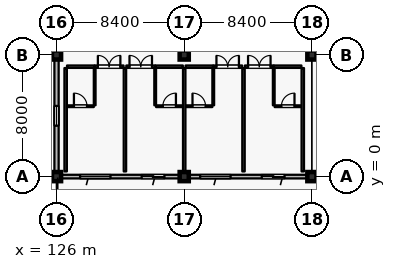
"""IFC4 building model, lengths in metres.
Left out: names, types, materials, properties, quantities, classifications, styles, units other than length and angle.
Written with IfcOpenShell. Run it as: python <this file> out.ifc"""

import sys

from ifc_helpers import new_model, si_unit, direction, frame, frame_2d, origin, origin_2d, place, context, subcontext, project, spatial, rectangle, extrude, element, fill, save


model = new_model("IFC4")
c1 = context("Model", 3, precision=1e-05, world=origin(), true_north=direction((0.0, 1.0)))
c2 = subcontext(c1, "Body", "Model", "MODEL_VIEW")
j1 = project(units=[si_unit("LENGTHUNIT", "METRE"), si_unit("PLANEANGLEUNIT", "RADIAN")], contexts=[c1])
p1 = place(None, origin())
s1 = spatial("IfcSite", under=j1, at=p1, CompositionType="ELEMENT")
p2 = place(p1, origin())
s2 = spatial("IfcBuilding", under=s1, at=p2, CompositionType="ELEMENT")
p3 = place(p2, frame((0.0, 0.0, 47.4)))
s3 = spatial("IfcBuildingStorey", under=s2, at=p3, CompositionType="ELEMENT", Elevation=47.4)
for number, where, z_axis, x_axis in (
    (1, (126.0, 0.0, 0.0), (0.0, 0.0, 1.0), (1.0, 0.0, 0.0)),
    (2, (134.4, 0.0, 0.0), (0.0, 0.0, 1.0), (1.0, 0.0, 0.0)),
    (3, (142.8, 0.0, 0.0), (0.0, 0.0, 1.0), (1.0, 0.0, 0.0)),
    (4, (126.0, 8.0, 0.0), (0.0, 0.0, 1.0), (1.0, 0.0, 0.0)),
    (5, (134.4, 8.0, 0.0), (0.0, 0.0, 1.0), (1.0, 0.0, 0.0)),
    (6, (142.8, 8.0, 0.0), (0.0, 0.0, 1.0), (1.0, 0.0, 0.0)),
):
    element("IfcColumn", number, at=place(p3, frame(where, z_axis=z_axis, x_axis=x_axis)), inside=s3, PredefinedType="COLUMN", context=c2, shape_type="SweptSolid", body=[
        extrude(rectangle(XDim=0.6, YDim=0.6, at=origin_2d()), origin(), (0.0, 0.0, 1.0), 4.2),
    ])
p4 = place(p3, frame((134.1, 0.0, 0.0), z_axis=(0.0, 0.0, 1.0), x_axis=(-1.0, 0.0, 0.0)))
e7 = element("IfcWall", 7, at=p4, inside=s3, PredefinedType="SOLIDWALL", context=c2, shape_type="SweptSolid", body=[
    extrude(rectangle(XDim=7.8, YDim=0.24, at=frame_2d((3.9, 0.0))), origin(), (0.0, 0.0, 1.0), 3.49),
])
p5 = place(p4, frame((1.0, 0.0, 0.0)))
e8 = element("IfcOpeningElement", 8, at=p5, cuts=e7, PredefinedType="OPENING", context=c2, shape_type="SweptSolid", body=[
    extrude(rectangle(XDim=1.5, YDim=2.25, at=frame_2d((0.75, 1.125))), frame((0.0, 0.13, 0.0), z_axis=(0.0, -1.0, 0.0), x_axis=(1.0, 0.0, 0.0)), (0.0, 0.0, 1.0), 0.26),
])
p6 = place(p4, frame((4.55, 0.0, 0.8)))
e9 = element("IfcOpeningElement", 9, at=p6, cuts=e7, PredefinedType="OPENING", context=c2, shape_type="SweptSolid", body=[
    extrude(rectangle(XDim=2.0, YDim=1.75, at=frame_2d((1.0, 0.875))), frame((0.0, 0.13, 0.0), z_axis=(0.0, -1.0, 0.0), x_axis=(1.0, 0.0, 0.0)), (0.0, 0.0, 1.0), 0.26),
])
p7 = place(p3, frame((142.5, 0.0, 0.0), z_axis=(0.0, 0.0, 1.0), x_axis=(-1.0, 0.0, 0.0)))
e10 = element("IfcWall", 10, at=p7, inside=s3, PredefinedType="SOLIDWALL", context=c2, shape_type="SweptSolid", body=[
    extrude(rectangle(XDim=7.8, YDim=0.24, at=frame_2d((3.9, 0.0))), origin(), (0.0, 0.0, 1.0), 3.49),
])
p8 = place(p7, frame((1.5, 0.0, 0.0)))
e11 = element("IfcOpeningElement", 11, at=p8, cuts=e10, PredefinedType="OPENING", context=c2, shape_type="SweptSolid", body=[
    extrude(rectangle(XDim=1.5, YDim=2.25, at=frame_2d((0.75, 1.125))), frame((0.0, 0.13, 0.0), z_axis=(0.0, -1.0, 0.0), x_axis=(1.0, 0.0, 0.0)), (0.0, 0.0, 1.0), 0.26),
])
p9 = place(p7, frame((5.05, 0.0, 0.8)))
e12 = element("IfcOpeningElement", 12, at=p9, cuts=e10, PredefinedType="OPENING", context=c2, shape_type="SweptSolid", body=[
    extrude(rectangle(XDim=2.0, YDim=1.75, at=frame_2d((1.0, 0.875))), frame((0.0, 0.13, 0.0), z_axis=(0.0, -1.0, 0.0), x_axis=(1.0, 0.0, 0.0)), (0.0, 0.0, 1.0), 0.26),
])
p10 = place(p3, frame((126.0, 0.3, 0.0), z_axis=(0.0, 0.0, 1.0), x_axis=(0.0, 1.0, 0.0)))
e13 = element("IfcWall", 13, at=p10, inside=s3, PredefinedType="SOLIDWALL", context=c2, shape_type="SweptSolid", body=[
    extrude(rectangle(XDim=7.4, YDim=0.28, at=frame_2d((3.7, 0.0))), origin(), (0.0, 0.0, 1.0), 3.3),
])
p11 = place(p10, frame((3.05, 0.0, 0.75)))
e14 = element("IfcOpeningElement", 14, at=p11, cuts=e13, PredefinedType="OPENING", context=c2, shape_type="SweptSolid", body=[
    extrude(rectangle(XDim=1.3, YDim=1.65, at=frame_2d((0.65, 0.825))), frame((0.0, 0.15, 0.0), z_axis=(0.0, -1.0, 0.0), x_axis=(1.0, 0.0, 0.0)), (0.0, 0.0, 1.0), 0.3),
])
p12 = place(p3, frame((126.69, 7.23, 0.0), z_axis=(0.0, 0.0, 1.0), x_axis=(1.0, 0.0, 0.0)))
e15 = element("IfcWall", 15, at=p12, inside=s3, PredefinedType="PARTITIONING", context=c2, shape_type="SweptSolid", body=[
    extrude(rectangle(XDim=1.81, YDim=0.16, at=frame_2d((0.905, 0.0))), origin(), (0.0, 0.0, 1.0), 3.935),
])
p13 = place(p3, frame((128.51, 7.23, 0.0), z_axis=(0.0, 0.0, 1.0), x_axis=(1.0, 0.0, 0.0)))
e16 = element("IfcWall", 16, at=p13, inside=s3, PredefinedType="PARTITIONING", context=c2, shape_type="SweptSolid", body=[
    extrude(rectangle(XDim=1.9, YDim=0.16, at=frame_2d((0.95, 0.0))), origin(), (0.0, 0.0, 1.0), 3.935),
])
p14 = place(p13, frame((0.21, 0.0, 0.0)))
e17 = element("IfcOpeningElement", 17, at=p14, cuts=e16, PredefinedType="OPENING", context=c2, shape_type="SweptSolid", body=[
    extrude(rectangle(XDim=1.48, YDim=2.35, at=frame_2d((0.74, 1.175))), frame((0.0, 0.09, 0.0), z_axis=(0.0, -1.0, 0.0), x_axis=(1.0, 0.0, 0.0)), (0.0, 0.0, 1.0), 0.18),
])
p15 = place(p3, frame((128.51, 4.69, 0.0), z_axis=(0.0, 0.0, 1.0), x_axis=(0.0, 1.0, 0.0)))
e18 = element("IfcWall", 18, at=p15, inside=s3, PredefinedType="PARTITIONING", context=c2, shape_type="SweptSolid", body=[
    extrude(rectangle(XDim=2.45, YDim=0.115, at=frame_2d((1.225, 0.0))), origin(), (0.0, 0.0, 1.0), 3.935),
])
p16 = place(p3, frame((126.7, 4.63, 0.0), z_axis=(0.0, 0.0, 1.0), x_axis=(1.0, 0.0, 0.0)))
e19 = element("IfcWall", 19, at=p16, inside=s3, PredefinedType="PARTITIONING", context=c2, shape_type="SweptSolid", body=[
    extrude(rectangle(XDim=1.75, YDim=0.115, at=frame_2d((0.875, 0.0))), origin(), (0.0, 0.0, 1.0), 3.935),
])
p17 = place(p16, frame((0.445, 0.0, 0.0)))
e20 = element("IfcOpeningElement", 20, at=p17, cuts=e19, PredefinedType="OPENING", context=c2, shape_type="SweptSolid", body=[
    extrude(rectangle(XDim=0.86, YDim=2.12, at=frame_2d((0.43, 1.06))), frame((0.0, 0.067, 0.0), z_axis=(0.0, -1.0, 0.0), x_axis=(1.0, 0.0, 0.0)), (0.0, 0.0, 1.0), 0.135),
])
p18 = place(p3, frame((126.6, 0.34, 0.0), z_axis=(0.0, 0.0, 1.0), x_axis=(0.0, 1.0, 0.0)))
e21 = element("IfcWall", 21, at=p18, inside=s3, PredefinedType="PARTITIONING", context=c2, shape_type="SweptSolid", body=[
    extrude(rectangle(XDim=6.8, YDim=0.16, at=frame_2d((3.4, 0.0))), origin(), (0.0, 0.0, 1.0), 3.935),
])
p19 = place(p3, frame((130.59, 7.23, 0.0), z_axis=(0.0, 0.0, 1.0), x_axis=(1.0, 0.0, 0.0)))
e22 = element("IfcWall", 22, at=p19, inside=s3, PredefinedType="PARTITIONING", context=c2, shape_type="SweptSolid", body=[
    extrude(rectangle(XDim=1.9, YDim=0.16, at=frame_2d((0.95, 0.0))), origin(), (0.0, 0.0, 1.0), 3.935),
])
p20 = place(p19, frame((0.21, 0.0, 0.0)))
e23 = element("IfcOpeningElement", 23, at=p20, cuts=e22, PredefinedType="OPENING", context=c2, shape_type="SweptSolid", body=[
    extrude(rectangle(XDim=1.48, YDim=2.35, at=frame_2d((0.74, 1.175))), frame((0.0, 0.09, 0.0), z_axis=(0.0, -1.0, 0.0), x_axis=(1.0, 0.0, 0.0)), (0.0, 0.0, 1.0), 0.18),
])
p21 = place(p3, frame((132.5, 7.23, 0.0), z_axis=(0.0, 0.0, 1.0), x_axis=(1.0, 0.0, 0.0)))
e24 = element("IfcWall", 24, at=p21, inside=s3, PredefinedType="PARTITIONING", context=c2, shape_type="SweptSolid", body=[
    extrude(rectangle(XDim=1.81, YDim=0.16, at=frame_2d((0.905, 0.0))), origin(), (0.0, 0.0, 1.0), 3.935),
])
p22 = place(p3, frame((132.49, 4.69, 0.0), z_axis=(0.0, 0.0, 1.0), x_axis=(0.0, 1.0, 0.0)))
e25 = element("IfcWall", 25, at=p22, inside=s3, PredefinedType="PARTITIONING", context=c2, shape_type="SweptSolid", body=[
    extrude(rectangle(XDim=2.45, YDim=0.115, at=frame_2d((1.225, 0.0))), origin(), (0.0, 0.0, 1.0), 3.935),
])
p23 = place(p3, frame((132.55, 4.63, 0.0), z_axis=(0.0, 0.0, 1.0), x_axis=(1.0, 0.0, 0.0)))
e26 = element("IfcWall", 26, at=p23, inside=s3, PredefinedType="PARTITIONING", context=c2, shape_type="SweptSolid", body=[
    extrude(rectangle(XDim=1.75, YDim=0.115, at=frame_2d((0.875, 0.0))), origin(), (0.0, 0.0, 1.0), 3.935),
])
p24 = place(p23, frame((0.445, 0.0, 0.0)))
e27 = element("IfcOpeningElement", 27, at=p24, cuts=e26, PredefinedType="OPENING", context=c2, shape_type="SweptSolid", body=[
    extrude(rectangle(XDim=0.86, YDim=2.12, at=frame_2d((0.43, 1.06))), frame((0.0, 0.067, 0.0), z_axis=(0.0, -1.0, 0.0), x_axis=(1.0, 0.0, 0.0)), (0.0, 0.0, 1.0), 0.135),
])
p25 = place(p3, frame((130.5, 0.34, 0.0), z_axis=(0.0, 0.0, 1.0), x_axis=(0.0, 1.0, 0.0)))
e28 = element("IfcWall", 28, at=p25, inside=s3, PredefinedType="PARTITIONING", context=c2, shape_type="SweptSolid", body=[
    extrude(rectangle(XDim=6.8, YDim=0.16, at=frame_2d((3.4, 0.0))), origin(), (0.0, 0.0, 1.0), 3.935),
])
p26 = place(p3, frame((134.49, 7.23, 0.0), z_axis=(0.0, 0.0, 1.0), x_axis=(1.0, 0.0, 0.0)))
e29 = element("IfcWall", 29, at=p26, inside=s3, PredefinedType="PARTITIONING", context=c2, shape_type="SweptSolid", body=[
    extrude(rectangle(XDim=1.81, YDim=0.16, at=frame_2d((0.905, 0.0))), origin(), (0.0, 0.0, 1.0), 3.935),
])
p27 = place(p3, frame((136.31, 7.23, 0.0), z_axis=(0.0, 0.0, 1.0), x_axis=(1.0, 0.0, 0.0)))
e30 = element("IfcWall", 30, at=p27, inside=s3, PredefinedType="PARTITIONING", context=c2, shape_type="SweptSolid", body=[
    extrude(rectangle(XDim=1.9, YDim=0.16, at=frame_2d((0.95, 0.0))), origin(), (0.0, 0.0, 1.0), 3.935),
])
p28 = place(p27, frame((0.21, 0.0, 0.0)))
e31 = element("IfcOpeningElement", 31, at=p28, cuts=e30, PredefinedType="OPENING", context=c2, shape_type="SweptSolid", body=[
    extrude(rectangle(XDim=1.48, YDim=2.35, at=frame_2d((0.74, 1.175))), frame((0.0, 0.09, 0.0), z_axis=(0.0, -1.0, 0.0), x_axis=(1.0, 0.0, 0.0)), (0.0, 0.0, 1.0), 0.18),
])
p29 = place(p3, frame((136.31, 4.69, 0.0), z_axis=(0.0, 0.0, 1.0), x_axis=(0.0, 1.0, 0.0)))
e32 = element("IfcWall", 32, at=p29, inside=s3, PredefinedType="PARTITIONING", context=c2, shape_type="SweptSolid", body=[
    extrude(rectangle(XDim=2.45, YDim=0.115, at=frame_2d((1.225, 0.0))), origin(), (0.0, 0.0, 1.0), 3.935),
])
p30 = place(p3, frame((134.5, 4.63, 0.0), z_axis=(0.0, 0.0, 1.0), x_axis=(1.0, 0.0, 0.0)))
e33 = element("IfcWall", 33, at=p30, inside=s3, PredefinedType="PARTITIONING", context=c2, shape_type="SweptSolid", body=[
    extrude(rectangle(XDim=1.75, YDim=0.115, at=frame_2d((0.875, 0.0))), origin(), (0.0, 0.0, 1.0), 3.935),
])
p31 = place(p30, frame((0.445, 0.0, 0.0)))
e34 = element("IfcOpeningElement", 34, at=p31, cuts=e33, PredefinedType="OPENING", context=c2, shape_type="SweptSolid", body=[
    extrude(rectangle(XDim=0.86, YDim=2.12, at=frame_2d((0.43, 1.06))), frame((0.0, 0.067, 0.0), z_axis=(0.0, -1.0, 0.0), x_axis=(1.0, 0.0, 0.0)), (0.0, 0.0, 1.0), 0.135),
])
p32 = place(p3, frame((134.4, 0.34, 0.0), z_axis=(0.0, 0.0, 1.0), x_axis=(0.0, 1.0, 0.0)))
e35 = element("IfcWall", 35, at=p32, inside=s3, PredefinedType="PARTITIONING", context=c2, shape_type="SweptSolid", body=[
    extrude(rectangle(XDim=6.8, YDim=0.16, at=frame_2d((3.4, 0.0))), origin(), (0.0, 0.0, 1.0), 3.29),
])
p33 = place(p3, frame((138.39, 7.23, 0.0), z_axis=(0.0, 0.0, 1.0), x_axis=(1.0, 0.0, 0.0)))
e36 = element("IfcWall", 36, at=p33, inside=s3, PredefinedType="PARTITIONING", context=c2, shape_type="SweptSolid", body=[
    extrude(rectangle(XDim=1.9, YDim=0.16, at=frame_2d((0.95, 0.0))), origin(), (0.0, 0.0, 1.0), 3.935),
])
p34 = place(p33, frame((0.21, 0.0, 0.0)))
e37 = element("IfcOpeningElement", 37, at=p34, cuts=e36, PredefinedType="OPENING", context=c2, shape_type="SweptSolid", body=[
    extrude(rectangle(XDim=1.48, YDim=2.35, at=frame_2d((0.74, 1.175))), frame((0.0, 0.09, 0.0), z_axis=(0.0, -1.0, 0.0), x_axis=(1.0, 0.0, 0.0)), (0.0, 0.0, 1.0), 0.18),
])
p35 = place(p3, frame((140.3, 7.23, 0.0), z_axis=(0.0, 0.0, 1.0), x_axis=(1.0, 0.0, 0.0)))
e38 = element("IfcWall", 38, at=p35, inside=s3, PredefinedType="PARTITIONING", context=c2, shape_type="SweptSolid", body=[
    extrude(rectangle(XDim=1.81, YDim=0.16, at=frame_2d((0.905, 0.0))), origin(), (0.0, 0.0, 1.0), 3.935),
])
p36 = place(p3, frame((140.29, 4.69, 0.0), z_axis=(0.0, 0.0, 1.0), x_axis=(0.0, 1.0, 0.0)))
e39 = element("IfcWall", 39, at=p36, inside=s3, PredefinedType="PARTITIONING", context=c2, shape_type="SweptSolid", body=[
    extrude(rectangle(XDim=2.45, YDim=0.115, at=frame_2d((1.225, 0.0))), origin(), (0.0, 0.0, 1.0), 3.935),
])
p37 = place(p3, frame((140.35, 4.63, 0.0), z_axis=(0.0, 0.0, 1.0), x_axis=(1.0, 0.0, 0.0)))
e40 = element("IfcWall", 40, at=p37, inside=s3, PredefinedType="PARTITIONING", context=c2, shape_type="SweptSolid", body=[
    extrude(rectangle(XDim=1.75, YDim=0.115, at=frame_2d((0.875, 0.0))), origin(), (0.0, 0.0, 1.0), 3.935),
])
p38 = place(p37, frame((0.445, 0.0, 0.0)))
e41 = element("IfcOpeningElement", 41, at=p38, cuts=e40, PredefinedType="OPENING", context=c2, shape_type="SweptSolid", body=[
    extrude(rectangle(XDim=0.86, YDim=2.12, at=frame_2d((0.43, 1.06))), frame((0.0, 0.067, 0.0), z_axis=(0.0, -1.0, 0.0), x_axis=(1.0, 0.0, 0.0)), (0.0, 0.0, 1.0), 0.135),
])
for number, where, z_axis, x_axis in (
    (42, (138.3, 0.34, 0.0), (0.0, 0.0, 1.0), (0.0, 1.0, 0.0)),
    (43, (142.2, 0.34, 0.0), (0.0, 0.0, 1.0), (0.0, 1.0, 0.0)),
):
    element("IfcWall", number, at=place(p3, frame(where, z_axis=z_axis, x_axis=x_axis)), inside=s3, PredefinedType="PARTITIONING", context=c2, shape_type="SweptSolid", body=[
        extrude(rectangle(XDim=6.8, YDim=0.16, at=frame_2d((3.4, 0.0))), origin(), (0.0, 0.0, 1.0), 3.935),
    ])
p39 = place(p5, origin())
e44 = element("IfcDoor", 44, at=p39, inside=s3, OperationType="SLIDING_TO_LEFT", PredefinedType="DOOR", context=c2, shape_type="SweptSolid", body=[
    extrude(rectangle(XDim=1.5, YDim=2.25, at=frame_2d((0.75, 1.125))), frame((0.0, 0.025, 0.0), z_axis=(0.0, -1.0, 0.0), x_axis=(1.0, 0.0, 0.0)), (0.0, 0.0, 1.0), 0.05),
])
fill(e8, e44)
p40 = place(p6, origin())
e45 = element("IfcWindow", 45, at=p40, inside=s3, PartitioningType="DOUBLE_PANEL_VERTICAL", PredefinedType="WINDOW", context=c2, shape_type="SweptSolid", body=[
    extrude(rectangle(XDim=2.0, YDim=1.75, at=frame_2d((1.0, 0.875))), frame((0.0, 0.03, 0.0), z_axis=(0.0, -1.0, 0.0), x_axis=(1.0, 0.0, 0.0)), (0.0, 0.0, 1.0), 0.06),
])
fill(e9, e45)
p41 = place(p8, origin())
e46 = element("IfcDoor", 46, at=p41, inside=s3, OperationType="SLIDING_TO_LEFT", PredefinedType="DOOR", context=c2, shape_type="SweptSolid", body=[
    extrude(rectangle(XDim=1.5, YDim=2.25, at=frame_2d((0.75, 1.125))), frame((0.0, 0.025, 0.0), z_axis=(0.0, -1.0, 0.0), x_axis=(1.0, 0.0, 0.0)), (0.0, 0.0, 1.0), 0.05),
])
fill(e11, e46)
p42 = place(p9, origin())
e47 = element("IfcWindow", 47, at=p42, inside=s3, PartitioningType="DOUBLE_PANEL_VERTICAL", PredefinedType="WINDOW", context=c2, shape_type="SweptSolid", body=[
    extrude(rectangle(XDim=2.0, YDim=1.75, at=frame_2d((1.0, 0.875))), frame((0.0, 0.03, 0.0), z_axis=(0.0, -1.0, 0.0), x_axis=(1.0, 0.0, 0.0)), (0.0, 0.0, 1.0), 0.06),
])
fill(e12, e47)
p43 = place(p11, origin())
e48 = element("IfcWindow", 48, at=p43, inside=s3, PartitioningType="SINGLE_PANEL", PredefinedType="WINDOW", context=c2, shape_type="SweptSolid", body=[
    extrude(rectangle(XDim=1.3, YDim=1.65, at=frame_2d((0.65, 0.825))), frame((0.0, 0.03, 0.0), z_axis=(0.0, -1.0, 0.0), x_axis=(1.0, 0.0, 0.0)), (0.0, 0.0, 1.0), 0.06),
])
fill(e14, e48)
p44 = place(p14, origin())
e49 = element("IfcDoor", 49, at=p44, inside=s3, OperationType="DOUBLE_DOOR_SINGLE_SWING", PredefinedType="DOOR", context=c2, shape_type="SweptSolid", body=[
    extrude(rectangle(XDim=1.48, YDim=2.35, at=frame_2d((0.74, 1.175))), frame((0.0, 0.025, 0.0), z_axis=(0.0, -1.0, 0.0), x_axis=(1.0, 0.0, 0.0)), (0.0, 0.0, 1.0), 0.05),
])
fill(e17, e49)
p45 = place(p17, origin())
e50 = element("IfcDoor", 50, at=p45, inside=s3, OperationType="SINGLE_SWING_LEFT", PredefinedType="DOOR", context=c2, shape_type="SweptSolid", body=[
    extrude(rectangle(XDim=0.86, YDim=2.12, at=frame_2d((0.43, 1.06))), frame((0.0, 0.025, 0.0), z_axis=(0.0, -1.0, 0.0), x_axis=(1.0, 0.0, 0.0)), (0.0, 0.0, 1.0), 0.05),
])
fill(e20, e50)
p46 = place(p20, origin())
e51 = element("IfcDoor", 51, at=p46, inside=s3, OperationType="DOUBLE_DOOR_SINGLE_SWING", PredefinedType="DOOR", context=c2, shape_type="SweptSolid", body=[
    extrude(rectangle(XDim=1.48, YDim=2.35, at=frame_2d((0.74, 1.175))), frame((0.0, 0.025, 0.0), z_axis=(0.0, -1.0, 0.0), x_axis=(1.0, 0.0, 0.0)), (0.0, 0.0, 1.0), 0.05),
])
fill(e23, e51)
p47 = place(p24, origin())
e52 = element("IfcDoor", 52, at=p47, inside=s3, OperationType="SINGLE_SWING_RIGHT", PredefinedType="DOOR", context=c2, shape_type="SweptSolid", body=[
    extrude(rectangle(XDim=0.86, YDim=2.12, at=frame_2d((0.43, 1.06))), frame((0.0, 0.025, 0.0), z_axis=(0.0, -1.0, 0.0), x_axis=(1.0, 0.0, 0.0)), (0.0, 0.0, 1.0), 0.05),
])
fill(e27, e52)
p48 = place(p28, origin())
e53 = element("IfcDoor", 53, at=p48, inside=s3, OperationType="DOUBLE_DOOR_SINGLE_SWING", PredefinedType="DOOR", context=c2, shape_type="SweptSolid", body=[
    extrude(rectangle(XDim=1.48, YDim=2.35, at=frame_2d((0.74, 1.175))), frame((0.0, 0.025, 0.0), z_axis=(0.0, -1.0, 0.0), x_axis=(1.0, 0.0, 0.0)), (0.0, 0.0, 1.0), 0.05),
])
fill(e31, e53)
p49 = place(p31, origin())
e54 = element("IfcDoor", 54, at=p49, inside=s3, OperationType="SINGLE_SWING_LEFT", PredefinedType="DOOR", context=c2, shape_type="SweptSolid", body=[
    extrude(rectangle(XDim=0.86, YDim=2.12, at=frame_2d((0.43, 1.06))), frame((0.0, 0.025, 0.0), z_axis=(0.0, -1.0, 0.0), x_axis=(1.0, 0.0, 0.0)), (0.0, 0.0, 1.0), 0.05),
])
fill(e34, e54)
p50 = place(p34, origin())
e55 = element("IfcDoor", 55, at=p50, inside=s3, OperationType="DOUBLE_DOOR_SINGLE_SWING", PredefinedType="DOOR", context=c2, shape_type="SweptSolid", body=[
    extrude(rectangle(XDim=1.48, YDim=2.35, at=frame_2d((0.74, 1.175))), frame((0.0, 0.025, 0.0), z_axis=(0.0, -1.0, 0.0), x_axis=(1.0, 0.0, 0.0)), (0.0, 0.0, 1.0), 0.05),
])
fill(e37, e55)
p51 = place(p38, origin())
e56 = element("IfcDoor", 56, at=p51, inside=s3, OperationType="SINGLE_SWING_RIGHT", PredefinedType="DOOR", context=c2, shape_type="SweptSolid", body=[
    extrude(rectangle(XDim=0.86, YDim=2.12, at=frame_2d((0.43, 1.06))), frame((0.0, 0.025, 0.0), z_axis=(0.0, -1.0, 0.0), x_axis=(1.0, 0.0, 0.0)), (0.0, 0.0, 1.0), 0.05),
])
fill(e41, e56)
save(model, sys.argv[1])
